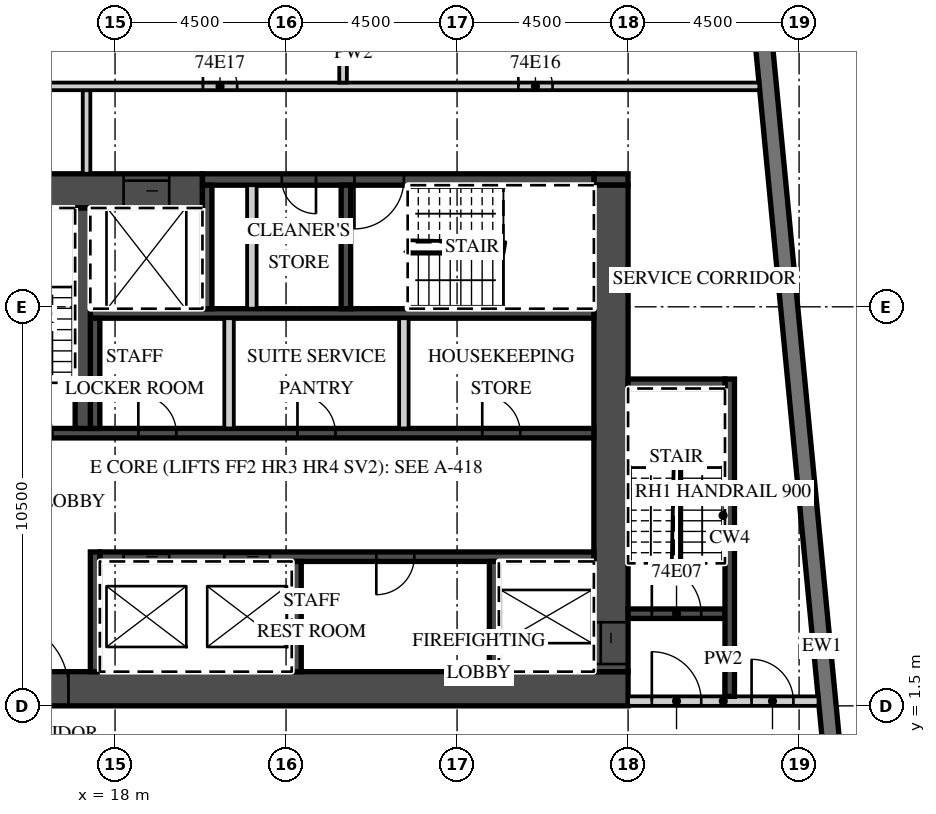
"""IFC4 building model, lengths in metres.
Left out: names, types, materials, properties, quantities, classifications, styles, units other than length and angle.
Written with IfcOpenShell. Run it as: python <this file> out.ifc"""

import sys

from ifc_helpers import new_model, si_unit, direction, frame, frame_2d, origin, place, context, subcontext, project, spatial, rectangle, extrude, element, fill, save


model = new_model("IFC4")
c1 = context("Model", 3, precision=1e-05, world=origin(), true_north=direction((0.0, 1.0)))
c2 = subcontext(c1, "Body", "Model", "MODEL_VIEW")
j1 = project(units=[si_unit("LENGTHUNIT", "METRE"), si_unit("PLANEANGLEUNIT", "RADIAN")], contexts=[c1])
p1 = place(None, origin())
s1 = spatial("IfcSite", under=j1, at=p1, CompositionType="ELEMENT")
p2 = place(p1, origin())
s2 = spatial("IfcBuilding", under=s1, at=p2, CompositionType="ELEMENT")
p3 = place(p2, frame((0.0, 0.0, 294.9)))
s3 = spatial("IfcBuildingStorey", under=s2, at=p3, CompositionType="ELEMENT", Elevation=294.9)
p4 = place(p3, frame((38.132, -12.858, 0.0), z_axis=(0.0, 0.0, 1.0), x_axis=(-0.095847749461, 0.995396006082, 0.0)))
e1 = element("IfcWall", 1, at=p4, inside=s3, PredefinedType="SOLIDWALL", context=c2, shape_type="SweptSolid", body=[
    extrude(rectangle(XDim=32.0, YDim=0.45, at=frame_2d((16.0, 0.0))), origin(), (0.0, 0.0, 1.0), 3.02),
])
p5 = place(p3, frame((13.5, 1.95, 0.0), z_axis=(0.0, 0.0, 1.0), x_axis=(1.0, 0.0, 0.0)))
e2 = element("IfcWall", 2, at=p5, inside=s3, PredefinedType="SHEAR", context=c2, shape_type="SweptSolid", body=[
    extrude(rectangle(XDim=18.0, YDim=0.9, at=frame_2d((9.0, 0.0))), origin(), (0.0, 0.0, 1.0), 3.02),
])
p6 = place(p5, frame((1.475, 0.0, 0.0)))
e3 = element("IfcOpeningElement", 3, at=p6, cuts=e2, PredefinedType="OPENING", context=c2, shape_type="SweptSolid", body=[
    extrude(rectangle(XDim=1.8, YDim=2.1, at=frame_2d((0.9, 1.05))), frame((0.0, 0.46, 0.0), z_axis=(0.0, -1.0, 0.0), x_axis=(1.0, 0.0, 0.0)), (0.0, 0.0, 1.0), 0.92),
])
p7 = place(p3, frame((13.5, 15.05, 0.0), z_axis=(0.0, 0.0, 1.0), x_axis=(1.0, 0.0, 0.0)))
e4 = element("IfcWall", 4, at=p7, inside=s3, PredefinedType="SHEAR", context=c2, shape_type="SweptSolid", body=[
    extrude(rectangle(XDim=6.8, YDim=0.9, at=frame_2d((3.4, 0.0))), origin(), (0.0, 0.0, 1.0), 3.02),
])
p8 = place(p7, frame((4.725, 0.0, 0.0)))
e5 = element("IfcOpeningElement", 5, at=p8, cuts=e4, PredefinedType="OPENING", context=c2, shape_type="SweptSolid", body=[
    extrude(rectangle(XDim=1.2, YDim=2.1, at=frame_2d((0.6, 1.05))), frame((0.0, 0.46, 0.0), z_axis=(0.0, -1.0, 0.0), x_axis=(1.0, 0.0, 0.0)), (0.0, 0.0, 1.0), 0.92),
])
p9 = place(p3, frame((30.6, 15.35, 0.0), z_axis=(0.0, 0.0, 1.0), x_axis=(1.0, 0.0, 0.0)))
e6 = element("IfcWall", 6, at=p9, inside=s3, PredefinedType="SHEAR", context=c2, shape_type="SweptSolid", body=[
    extrude(rectangle(XDim=0.9, YDim=0.3, at=frame_2d((0.45, 0.0))), origin(), (0.0, 0.0, 1.0), 3.02),
])
p10 = place(p3, frame((20.3, 15.35, 0.0), z_axis=(0.0, 0.0, 1.0), x_axis=(1.0, 0.0, 0.0)))
e7 = element("IfcWall", 7, at=p10, inside=s3, PredefinedType="SHEAR", context=c2, shape_type="SweptSolid", body=[
    extrude(rectangle(XDim=10.3, YDim=0.3, at=frame_2d((5.15, 0.0))), origin(), (0.0, 0.0, 1.0), 3.02),
])
p11 = place(p10, frame((4.0, 0.0, 0.0)))
e8 = element("IfcOpeningElement", 8, at=p11, cuts=e7, PredefinedType="OPENING", context=c2, shape_type="SweptSolid", body=[
    extrude(rectangle(XDim=1.3, YDim=2.1, at=frame_2d((0.65, 1.05))), frame((0.0, 0.16, 0.0), z_axis=(0.0, -1.0, 0.0), x_axis=(1.0, 0.0, 0.0)), (0.0, 0.0, 1.0), 0.32),
])
p12 = place(p10, frame((2.087, 0.0, 0.0)))
e9 = element("IfcOpeningElement", 9, at=p12, cuts=e7, PredefinedType="OPENING", context=c2, shape_type="SweptSolid", body=[
    extrude(rectangle(XDim=0.9, YDim=2.1, at=frame_2d((0.45, 1.05))), frame((0.0, 0.16, 0.0), z_axis=(0.0, -1.0, 0.0), x_axis=(1.0, 0.0, 0.0)), (0.0, 0.0, 1.0), 0.32),
])
p13 = place(p3, frame((31.05, 2.4, 0.0), z_axis=(0.0, 0.0, 1.0), x_axis=(0.0, 1.0, 0.0)))
e10 = element("IfcWall", 10, at=p13, inside=s3, PredefinedType="SHEAR", context=c2, shape_type="SweptSolid", body=[
    extrude(rectangle(XDim=12.8, YDim=0.9, at=frame_2d((6.4, 0.0))), origin(), (0.0, 0.0, 1.0), 3.02),
])
p14 = place(p13, frame((0.2, 0.0, 0.0)))
e11 = element("IfcOpeningElement", 11, at=p14, cuts=e10, PredefinedType="OPENING", context=c2, shape_type="SweptSolid", body=[
    extrude(rectangle(XDim=1.1, YDim=2.1, at=frame_2d((0.55, 1.05))), frame((0.0, 0.46, 0.0), z_axis=(0.0, -1.0, 0.0), x_axis=(1.0, 0.0, 0.0)), (0.0, 0.0, 1.0), 0.92),
])
p15 = place(p3, frame((17.6, 5.425, 0.0), z_axis=(0.0, 0.0, 1.0), x_axis=(1.0, 0.0, 0.0)))
e12 = element("IfcWall", 12, at=p15, inside=s3, PredefinedType="SHEAR", context=c2, shape_type="SweptSolid", body=[
    extrude(rectangle(XDim=13.0, YDim=0.25, at=frame_2d((6.5, 0.0))), origin(), (0.0, 0.0, 1.0), 3.02),
])
p16 = place(p15, frame((3.275, 0.0, 0.0)))
e13 = element("IfcOpeningElement", 13, at=p16, cuts=e12, PredefinedType="OPENING", context=c2, shape_type="SweptSolid", body=[
    extrude(rectangle(XDim=1.2, YDim=2.1, at=frame_2d((0.6, 1.05))), frame((0.0, 0.135, 0.0), z_axis=(0.0, -1.0, 0.0), x_axis=(1.0, 0.0, 0.0)), (0.0, 0.0, 1.0), 0.27),
])
p17 = place(p15, frame((0.625, 0.0, 0.0)))
e14 = element("IfcOpeningElement", 14, at=p17, cuts=e12, PredefinedType="OPENING", context=c2, shape_type="SweptSolid", body=[
    extrude(rectangle(XDim=1.2, YDim=2.1, at=frame_2d((0.6, 1.05))), frame((0.0, 0.135, 0.0), z_axis=(0.0, -1.0, 0.0), x_axis=(1.0, 0.0, 0.0)), (0.0, 0.0, 1.0), 0.27),
])
p18 = place(p15, frame((7.275, 0.0, 0.0)))
e15 = element("IfcOpeningElement", 15, at=p18, cuts=e12, PredefinedType="OPENING", context=c2, shape_type="SweptSolid", body=[
    extrude(rectangle(XDim=1.0, YDim=2.1, at=frame_2d((0.5, 1.05))), frame((0.0, 0.135, 0.0), z_axis=(0.0, -1.0, 0.0), x_axis=(1.0, 0.0, 0.0)), (0.0, 0.0, 1.0), 0.27),
])
p19 = place(p3, frame((17.475, 2.4, 0.0), z_axis=(0.0, 0.0, 1.0), x_axis=(0.0, 1.0, 0.0)))
e16 = element("IfcWall", 16, at=p19, inside=s3, PredefinedType="SHEAR", context=c2, shape_type="SweptSolid", body=[
    extrude(rectangle(XDim=3.15, YDim=0.25, at=frame_2d((1.575, 0.0))), origin(), (0.0, 0.0, 1.0), 3.02),
])
for number, where, z_axis, x_axis in (
    (17, (27.975, 2.4, 0.0), (0.0, 0.0, 1.0), (0.0, 1.0, 0.0)),
    (18, (22.775, 2.4, 0.0), (0.0, 0.0, 1.0), (0.0, 1.0, 0.0)),
):
    element("IfcWall", number, at=place(p3, frame(where, z_axis=z_axis, x_axis=x_axis)), inside=s3, PredefinedType="SHEAR", context=c2, shape_type="SweptSolid", body=[
        extrude(rectangle(XDim=2.9, YDim=0.25, at=frame_2d((1.45, 0.0))), origin(), (0.0, 0.0, 1.0), 3.02),
    ])
p20 = place(p3, frame((14.4, 8.675, 0.0), z_axis=(0.0, 0.0, 1.0), x_axis=(1.0, 0.0, 0.0)))
e19 = element("IfcWall", 19, at=p20, inside=s3, PredefinedType="SHEAR", context=c2, shape_type="SweptSolid", body=[
    extrude(rectangle(XDim=16.2, YDim=0.25, at=frame_2d((8.1, 0.0))), origin(), (0.0, 0.0, 1.0), 3.02),
])
p21 = place(p20, frame((0.65, 0.0, 0.0)))
e20 = element("IfcOpeningElement", 20, at=p21, cuts=e19, PredefinedType="OPENING", context=c2, shape_type="SweptSolid", body=[
    extrude(rectangle(XDim=1.3, YDim=2.1, at=frame_2d((0.65, 1.05))), frame((0.0, 0.135, 0.0), z_axis=(0.0, -1.0, 0.0), x_axis=(1.0, 0.0, 0.0)), (0.0, 0.0, 1.0), 0.27),
])
p22 = place(p20, frame((13.262, 0.0, 0.0)))
e21 = element("IfcOpeningElement", 21, at=p22, cuts=e19, PredefinedType="OPENING", context=c2, shape_type="SweptSolid", body=[
    extrude(rectangle(XDim=1.0, YDim=2.1, at=frame_2d((0.5, 1.05))), frame((0.0, 0.135, 0.0), z_axis=(0.0, -1.0, 0.0), x_axis=(1.0, 0.0, 0.0)), (0.0, 0.0, 1.0), 0.27),
])
p23 = place(p20, frame((8.4, 0.0, 0.0)))
e22 = element("IfcOpeningElement", 22, at=p23, cuts=e19, PredefinedType="OPENING", context=c2, shape_type="SweptSolid", body=[
    extrude(rectangle(XDim=1.0, YDim=2.1, at=frame_2d((0.5, 1.05))), frame((0.0, 0.135, 0.0), z_axis=(0.0, -1.0, 0.0), x_axis=(1.0, 0.0, 0.0)), (0.0, 0.0, 1.0), 0.27),
])
p24 = place(p20, frame((4.212, 0.0, 0.0)))
e23 = element("IfcOpeningElement", 23, at=p24, cuts=e19, PredefinedType="OPENING", context=c2, shape_type="SweptSolid", body=[
    extrude(rectangle(XDim=1.0, YDim=2.1, at=frame_2d((0.5, 1.05))), frame((0.0, 0.135, 0.0), z_axis=(0.0, -1.0, 0.0), x_axis=(1.0, 0.0, 0.0)), (0.0, 0.0, 1.0), 0.27),
])
p25 = place(p3, frame((17.35, 11.825, 0.0), z_axis=(0.0, 0.0, 1.0), x_axis=(1.0, 0.0, 0.0)))
e24 = element("IfcWall", 24, at=p25, inside=s3, PredefinedType="SHEAR", context=c2, shape_type="SweptSolid", body=[
    extrude(rectangle(XDim=13.25, YDim=0.25, at=frame_2d((6.625, 0.0))), origin(), (0.0, 0.0, 1.0), 3.02),
])
p26 = place(p3, frame((17.475, 8.8, 0.0), z_axis=(0.0, 0.0, 1.0), x_axis=(0.0, 1.0, 0.0)))
e25 = element("IfcWall", 25, at=p26, inside=s3, PredefinedType="SHEAR", context=c2, shape_type="SweptSolid", body=[
    extrude(rectangle(XDim=2.9, YDim=0.25, at=frame_2d((1.45, 0.0))), origin(), (0.0, 0.0, 1.0), 3.02),
])
for number, where, z_axis, x_axis in (
    (26, (25.6, 8.8, 0.0), (0.0, 0.0, 1.0), (0.0, 1.0, 0.0)),
    (27, (21.0, 8.8, 0.0), (0.0, 0.0, 1.0), (0.0, 1.0, 0.0)),
):
    element("IfcWall", number, at=place(p3, frame(where, z_axis=z_axis, x_axis=x_axis)), inside=s3, PredefinedType="PARTITIONING", context=c2, shape_type="SweptSolid", body=[
        extrude(rectangle(XDim=2.9, YDim=0.25, at=frame_2d((1.45, 0.0))), origin(), (0.0, 0.0, 1.0), 3.02),
    ])
p27 = place(p3, frame((17.15, 8.8, 0.0), z_axis=(0.0, 0.0, 1.0), x_axis=(0.0, 1.0, 0.0)))
e28 = element("IfcWall", 28, at=p27, inside=s3, PredefinedType="SHEAR", context=c2, shape_type="SweptSolid", body=[
    extrude(rectangle(XDim=5.8, YDim=0.4, at=frame_2d((2.9, 0.0))), origin(), (0.0, 0.0, 1.0), 3.02),
])
for number, where, z_axis, x_axis in (
    (29, (20.425, 11.95, 0.0), (0.0, 0.0, 1.0), (0.0, 1.0, 0.0)),
    (30, (24.075, 11.95, 0.0), (0.0, 0.0, 1.0), (0.0, 1.0, 0.0)),
):
    element("IfcWall", number, at=place(p3, frame(where, z_axis=z_axis, x_axis=x_axis)), inside=s3, PredefinedType="SHEAR", context=c2, shape_type="SweptSolid", body=[
        extrude(rectangle(XDim=3.25, YDim=0.25, at=frame_2d((1.625, 0.0))), origin(), (0.0, 0.0, 1.0), 3.02),
    ])
p28 = place(p3, frame((21.6, 11.95, 0.0), z_axis=(0.0, 0.0, 1.0), x_axis=(0.0, 1.0, 0.0)))
e31 = element("IfcWall", 31, at=p28, inside=s3, PredefinedType="PARTITIONING", context=c2, shape_type="SweptSolid", body=[
    extrude(rectangle(XDim=3.25, YDim=0.25, at=frame_2d((1.625, 0.0))), origin(), (0.0, 0.0, 1.0), 3.02),
])
p29 = place(p3, frame((31.5, 1.625, 0.0), z_axis=(0.0, 0.0, 1.0), x_axis=(1.0, 0.0, 0.0)))
e32 = element("IfcWall", 32, at=p29, inside=s3, PredefinedType="PARTITIONING", context=c2, shape_type="SweptSolid", body=[
    extrude(rectangle(XDim=5.012, YDim=0.25, at=frame_2d((2.506, 0.0))), origin(), (0.0, 0.0, 1.0), 3.02),
])
p30 = place(p29, frame((0.625, 0.0, 0.0)))
e33 = element("IfcOpeningElement", 33, at=p30, cuts=e32, PredefinedType="OPENING", context=c2, shape_type="SweptSolid", body=[
    extrude(rectangle(XDim=1.3, YDim=2.1, at=frame_2d((0.65, 1.05))), frame((0.0, 0.135, 0.0), z_axis=(0.0, -1.0, 0.0), x_axis=(1.0, 0.0, 0.0)), (0.0, 0.0, 1.0), 0.27),
])
p31 = place(p29, frame((3.25, 0.0, 0.0)))
e34 = element("IfcOpeningElement", 34, at=p31, cuts=e32, PredefinedType="OPENING", context=c2, shape_type="SweptSolid", body=[
    extrude(rectangle(XDim=1.1, YDim=2.1, at=frame_2d((0.55, 1.05))), frame((0.0, 0.135, 0.0), z_axis=(0.0, -1.0, 0.0), x_axis=(1.0, 0.0, 0.0)), (0.0, 0.0, 1.0), 0.27),
])
p32 = place(p3, frame((31.5, 3.925, 0.0), z_axis=(0.0, 0.0, 1.0), x_axis=(1.0, 0.0, 0.0)))
e35 = element("IfcWall", 35, at=p32, inside=s3, PredefinedType="SHEAR", context=c2, shape_type="SweptSolid", body=[
    extrude(rectangle(XDim=2.55, YDim=0.25, at=frame_2d((1.275, 0.0))), origin(), (0.0, 0.0, 1.0), 3.02),
])
p33 = place(p32, frame((0.625, 0.0, 0.0)))
e36 = element("IfcOpeningElement", 36, at=p33, cuts=e35, PredefinedType="OPENING", context=c2, shape_type="SweptSolid", body=[
    extrude(rectangle(XDim=1.3, YDim=2.1, at=frame_2d((0.65, 1.05))), frame((0.0, 0.135, 0.0), z_axis=(0.0, -1.0, 0.0), x_axis=(1.0, 0.0, 0.0)), (0.0, 0.0, 1.0), 0.27),
])
p34 = place(p3, frame((34.175, 1.75, 0.0), z_axis=(0.0, 0.0, 1.0), x_axis=(0.0, 1.0, 0.0)))
e37 = element("IfcWall", 37, at=p34, inside=s3, PredefinedType="SHEAR", context=c2, shape_type="SweptSolid", body=[
    extrude(rectangle(XDim=8.35, YDim=0.25, at=frame_2d((4.175, 0.0))), origin(), (0.0, 0.0, 1.0), 3.02),
])
p35 = place(p3, frame((31.5, 9.975, 0.0), z_axis=(0.0, 0.0, 1.0), x_axis=(1.0, 0.0, 0.0)))
e38 = element("IfcWall", 38, at=p35, inside=s3, PredefinedType="SHEAR", context=c2, shape_type="SweptSolid", body=[
    extrude(rectangle(XDim=2.55, YDim=0.25, at=frame_2d((1.275, 0.0))), origin(), (0.0, 0.0, 1.0), 3.02),
])
p36 = place(p3, frame((17.25, 15.5, 0.0), z_axis=(0.0, 0.0, 1.0), x_axis=(0.0, 1.0, 0.0)))
e39 = element("IfcWall", 39, at=p36, inside=s3, PredefinedType="PARTITIONING", context=c2, shape_type="SweptSolid", body=[
    extrude(rectangle(XDim=2.2, YDim=0.2, at=frame_2d((1.1, 0.0))), origin(), (0.0, 0.0, 1.0), 3.02),
])
p37 = place(p3, frame((13.6, 17.8, 0.0), z_axis=(0.0, 0.0, 1.0), x_axis=(1.0, 0.0, 0.0)))
e40 = element("IfcWall", 40, at=p37, inside=s3, PredefinedType="PARTITIONING", context=c2, shape_type="SweptSolid", body=[
    extrude(rectangle(XDim=21.354, YDim=0.2, at=frame_2d((10.677, 0.0))), origin(), (0.0, 0.0, 1.0), 3.02),
])
p38 = place(p37, frame((15.012, 0.0, 0.0)))
e41 = element("IfcOpeningElement", 41, at=p38, cuts=e40, PredefinedType="OPENING", context=c2, shape_type="SweptSolid", body=[
    extrude(rectangle(XDim=0.9, YDim=2.1, at=frame_2d((0.45, 1.05))), frame((0.0, 0.11, 0.0), z_axis=(0.0, -1.0, 0.0), x_axis=(1.0, 0.0, 0.0)), (0.0, 0.0, 1.0), 0.22),
])
p39 = place(p37, frame((6.712, 0.0, 0.0)))
e42 = element("IfcOpeningElement", 42, at=p39, cuts=e40, PredefinedType="OPENING", context=c2, shape_type="SweptSolid", body=[
    extrude(rectangle(XDim=0.9, YDim=2.1, at=frame_2d((0.45, 1.05))), frame((0.0, 0.11, 0.0), z_axis=(0.0, -1.0, 0.0), x_axis=(1.0, 0.0, 0.0)), (0.0, 0.0, 1.0), 0.22),
])
p40 = place(p3, frame((24.0, 17.9, 0.0), z_axis=(0.0, 0.0, 1.0), x_axis=(0.0, 1.0, 0.0)))
e43 = element("IfcWall", 43, at=p40, inside=s3, PredefinedType="PARTITIONING", context=c2, shape_type="SweptSolid", body=[
    extrude(rectangle(XDim=3.597, YDim=0.2, at=frame_2d((1.798, 0.0))), origin(), (0.0, 0.0, 1.0), 3.02),
])
p41 = place(p16, origin())
e44 = element("IfcDoor", 44, at=p41, inside=s3, OperationType="SLIDING_TO_RIGHT", PredefinedType="DOOR", context=c2, shape_type="SweptSolid", body=[
    extrude(rectangle(XDim=1.2, YDim=2.1, at=frame_2d((0.6, 1.05))), frame((0.0, 0.025, 0.0), z_axis=(0.0, -1.0, 0.0), x_axis=(1.0, 0.0, 0.0)), (0.0, 0.0, 1.0), 0.05),
])
fill(e13, e44)
p42 = place(p17, origin())
e45 = element("IfcDoor", 45, at=p42, inside=s3, OperationType="SLIDING_TO_LEFT", PredefinedType="DOOR", context=c2, shape_type="SweptSolid", body=[
    extrude(rectangle(XDim=1.2, YDim=2.1, at=frame_2d((0.6, 1.05))), frame((0.0, 0.025, 0.0), z_axis=(0.0, -1.0, 0.0), x_axis=(1.0, 0.0, 0.0)), (0.0, 0.0, 1.0), 0.05),
])
fill(e14, e45)
p43 = place(p8, origin())
e46 = element("IfcDoor", 46, at=p43, inside=s3, OperationType="SLIDING_TO_LEFT", PredefinedType="DOOR", context=c2, shape_type="SweptSolid", body=[
    extrude(rectangle(XDim=1.2, YDim=2.1, at=frame_2d((0.6, 1.05))), frame((0.0, 0.025, 0.0), z_axis=(0.0, -1.0, 0.0), x_axis=(1.0, 0.0, 0.0)), (0.0, 0.0, 1.0), 0.05),
])
fill(e5, e46)
p44 = place(p14, origin())
e47 = element("IfcDoor", 47, at=p44, inside=s3, OperationType="SLIDING_TO_LEFT", PredefinedType="DOOR", context=c2, shape_type="SweptSolid", body=[
    extrude(rectangle(XDim=1.1, YDim=2.1, at=frame_2d((0.55, 1.05))), frame((0.0, 0.025, 0.0), z_axis=(0.0, -1.0, 0.0), x_axis=(1.0, 0.0, 0.0)), (0.0, 0.0, 1.0), 0.05),
])
fill(e11, e47)
p45 = place(p6, origin())
e48 = element("IfcDoor", 48, at=p45, inside=s3, OperationType="DOUBLE_DOOR_DOUBLE_SWING", PredefinedType="DOOR", context=c2, shape_type="SweptSolid", body=[
    extrude(rectangle(XDim=1.8, YDim=2.1, at=frame_2d((0.9, 1.05))), frame((0.0, 0.025, 0.0), z_axis=(0.0, -1.0, 0.0), x_axis=(1.0, 0.0, 0.0)), (0.0, 0.0, 1.0), 0.05),
])
fill(e3, e48)
p46 = place(p30, origin())
e49 = element("IfcDoor", 49, at=p46, inside=s3, OperationType="SINGLE_SWING_LEFT", PredefinedType="DOOR", context=c2, shape_type="SweptSolid", body=[
    extrude(rectangle(XDim=1.3, YDim=2.1, at=frame_2d((0.65, 1.05))), frame((0.0, 0.025, 0.0), z_axis=(0.0, -1.0, 0.0), x_axis=(1.0, 0.0, 0.0)), (0.0, 0.0, 1.0), 0.05),
])
fill(e33, e49)
p47 = place(p33, origin())
e50 = element("IfcDoor", 50, at=p47, inside=s3, OperationType="SINGLE_SWING_LEFT", PredefinedType="DOOR", context=c2, shape_type="SweptSolid", body=[
    extrude(rectangle(XDim=1.3, YDim=2.1, at=frame_2d((0.65, 1.05))), frame((0.0, 0.025, 0.0), z_axis=(0.0, -1.0, 0.0), x_axis=(1.0, 0.0, 0.0)), (0.0, 0.0, 1.0), 0.05),
])
fill(e36, e50)
p48 = place(p31, origin())
e51 = element("IfcDoor", 51, at=p48, inside=s3, OperationType="SINGLE_SWING_LEFT", PredefinedType="DOOR", context=c2, shape_type="SweptSolid", body=[
    extrude(rectangle(XDim=1.1, YDim=2.1, at=frame_2d((0.55, 1.05))), frame((0.0, 0.025, 0.0), z_axis=(0.0, -1.0, 0.0), x_axis=(1.0, 0.0, 0.0)), (0.0, 0.0, 1.0), 0.05),
])
fill(e34, e51)
p49 = place(p11, origin())
e52 = element("IfcDoor", 52, at=p49, inside=s3, OperationType="SINGLE_SWING_LEFT", PredefinedType="DOOR", context=c2, shape_type="SweptSolid", body=[
    extrude(rectangle(XDim=1.3, YDim=2.1, at=frame_2d((0.65, 1.05))), frame((0.0, 0.025, 0.0), z_axis=(0.0, -1.0, 0.0), x_axis=(1.0, 0.0, 0.0)), (0.0, 0.0, 1.0), 0.05),
])
fill(e8, e52)
p50 = place(p12, origin())
e53 = element("IfcDoor", 53, at=p50, inside=s3, OperationType="SINGLE_SWING_RIGHT", PredefinedType="DOOR", context=c2, shape_type="SweptSolid", body=[
    extrude(rectangle(XDim=0.9, YDim=2.1, at=frame_2d((0.45, 1.05))), frame((0.0, 0.025, 0.0), z_axis=(0.0, -1.0, 0.0), x_axis=(1.0, 0.0, 0.0)), (0.0, 0.0, 1.0), 0.05),
])
fill(e9, e53)
p51 = place(p22, origin())
e54 = element("IfcDoor", 54, at=p51, inside=s3, OperationType="SINGLE_SWING_LEFT", PredefinedType="DOOR", context=c2, shape_type="SweptSolid", body=[
    extrude(rectangle(XDim=1.0, YDim=2.1, at=frame_2d((0.5, 1.05))), frame((0.0, 0.025, 0.0), z_axis=(0.0, -1.0, 0.0), x_axis=(1.0, 0.0, 0.0)), (0.0, 0.0, 1.0), 0.05),
])
fill(e21, e54)
p52 = place(p23, origin())
e55 = element("IfcDoor", 55, at=p52, inside=s3, OperationType="SINGLE_SWING_LEFT", PredefinedType="DOOR", context=c2, shape_type="SweptSolid", body=[
    extrude(rectangle(XDim=1.0, YDim=2.1, at=frame_2d((0.5, 1.05))), frame((0.0, 0.025, 0.0), z_axis=(0.0, -1.0, 0.0), x_axis=(1.0, 0.0, 0.0)), (0.0, 0.0, 1.0), 0.05),
])
fill(e22, e55)
p53 = place(p24, origin())
e56 = element("IfcDoor", 56, at=p53, inside=s3, OperationType="SINGLE_SWING_LEFT", PredefinedType="DOOR", context=c2, shape_type="SweptSolid", body=[
    extrude(rectangle(XDim=1.0, YDim=2.1, at=frame_2d((0.5, 1.05))), frame((0.0, 0.025, 0.0), z_axis=(0.0, -1.0, 0.0), x_axis=(1.0, 0.0, 0.0)), (0.0, 0.0, 1.0), 0.05),
])
fill(e23, e56)
p54 = place(p18, origin())
e57 = element("IfcDoor", 57, at=p54, inside=s3, OperationType="SINGLE_SWING_LEFT", PredefinedType="DOOR", context=c2, shape_type="SweptSolid", body=[
    extrude(rectangle(XDim=1.0, YDim=2.1, at=frame_2d((0.5, 1.05))), frame((0.0, 0.025, 0.0), z_axis=(0.0, -1.0, 0.0), x_axis=(1.0, 0.0, 0.0)), (0.0, 0.0, 1.0), 0.05),
])
fill(e15, e57)
p55 = place(p38, origin())
e58 = element("IfcDoor", 58, at=p55, inside=s3, OperationType="SINGLE_SWING_LEFT", PredefinedType="DOOR", context=c2, shape_type="SweptSolid", body=[
    extrude(rectangle(XDim=0.9, YDim=2.1, at=frame_2d((0.45, 1.05))), frame((0.0, 0.025, 0.0), z_axis=(0.0, -1.0, 0.0), x_axis=(1.0, 0.0, 0.0)), (0.0, 0.0, 1.0), 0.05),
])
fill(e41, e58)
p56 = place(p39, origin())
e59 = element("IfcDoor", 59, at=p56, inside=s3, OperationType="SINGLE_SWING_LEFT", PredefinedType="DOOR", context=c2, shape_type="SweptSolid", body=[
    extrude(rectangle(XDim=0.9, YDim=2.1, at=frame_2d((0.45, 1.05))), frame((0.0, 0.025, 0.0), z_axis=(0.0, -1.0, 0.0), x_axis=(1.0, 0.0, 0.0)), (0.0, 0.0, 1.0), 0.05),
])
fill(e42, e59)
save(model, sys.argv[1])
